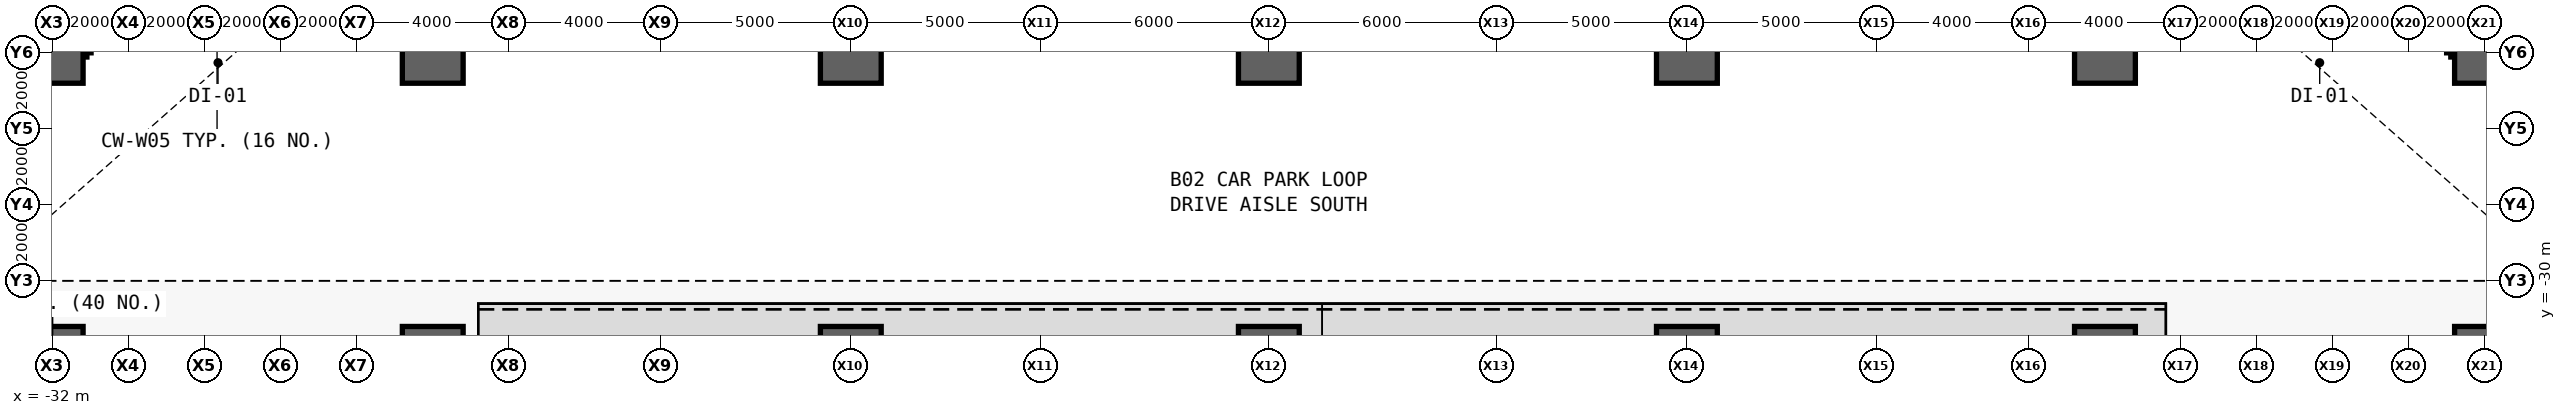
"""IFC4 building model, lengths in metres.
Left out: names, types, materials, properties, quantities, classifications, styles, units other than length and angle.
Written with IfcOpenShell. Run it as: python <this file> out.ifc"""

import sys

from ifc_helpers import new_model, si_unit, direction, frame, frame_2d, origin, origin_2d, place, context, subcontext, project, spatial, rectangle, extrude, source, transform, mapped, element, save


model = new_model("IFC4")
c1 = context("Model", 3, precision=1e-05, world=origin(), true_north=direction((0.0, 1.0)))
c2 = subcontext(c1, "Body", "Model", "MODEL_VIEW")
j1 = project(units=[si_unit("LENGTHUNIT", "METRE"), si_unit("PLANEANGLEUNIT", "RADIAN")], contexts=[c1])
p1 = place(None, origin())
s1 = spatial("IfcSite", under=j1, at=p1, CompositionType="ELEMENT")
p2 = place(p1, origin())
s2 = spatial("IfcBuilding", under=s1, at=p2, CompositionType="ELEMENT")
p3 = place(p2, frame((0.0, 0.0, -9.6)))
s3 = spatial("IfcBuildingStorey", under=s2, at=p3, CompositionType="ELEMENT", Elevation=-9.6)
m1 = source(origin(), c2, "Body", "SweptSolid", [
    extrude(rectangle(XDim=1.6, YDim=1.6, at=origin_2d()), origin(), (0.0, 0.0, 1.0), 4.8),
])
for number, where, z_axis, x_axis in (
    (1, (-32.0, -32.0, 0.0), (0.0, 0.0, 1.0), (1.0, 0.0, 0.0)),
    (2, (-32.0, -24.0, 0.0), (0.0, 0.0, 1.0), (1.0, 0.0, 0.0)),
    (3, (-22.0, -32.0, 0.0), (0.0, 0.0, 1.0), (1.0, 0.0, 0.0)),
    (4, (-22.0, -24.0, 0.0), (0.0, 0.0, 1.0), (1.0, 0.0, 0.0)),
    (5, (-11.0, -32.0, 0.0), (0.0, 0.0, 1.0), (1.0, 0.0, 0.0)),
    (6, (-11.0, -24.0, 0.0), (0.0, 0.0, 1.0), (1.0, 0.0, 0.0)),
    (7, (0.0, -32.0, 0.0), (0.0, 0.0, 1.0), (1.0, 0.0, 0.0)),
    (8, (0.0, -24.0, 0.0), (0.0, 0.0, 1.0), (1.0, 0.0, 0.0)),
    (9, (11.0, -32.0, 0.0), (0.0, 0.0, 1.0), (1.0, 0.0, 0.0)),
    (10, (11.0, -24.0, 0.0), (0.0, 0.0, 1.0), (1.0, 0.0, 0.0)),
    (11, (22.0, -32.0, 0.0), (0.0, 0.0, 1.0), (1.0, 0.0, 0.0)),
    (12, (22.0, -24.0, 0.0), (0.0, 0.0, 1.0), (1.0, 0.0, 0.0)),
    (13, (32.0, -32.0, 0.0), (0.0, 0.0, 1.0), (1.0, 0.0, 0.0)),
    (14, (32.0, -24.0, 0.0), (0.0, 0.0, 1.0), (1.0, 0.0, 0.0)),
):
    element("IfcColumn", number, at=place(p3, frame(where, z_axis=z_axis, x_axis=x_axis)), inside=s3, PredefinedType="COLUMN", context=c2, shape_type="MappedRepresentation", body=[
        mapped(m1, transform((0.0, 0.0, 0.0), scale=1.0)),
    ])
m2 = source(origin(), c2, "Body", "SweptSolid", [
    extrude(rectangle(XDim=48.0, YDim=0.22, at=frame_2d((24.0, 0.0))), origin(), (0.0, 0.0, 1.0), 4.48),
])
p4 = place(p3, frame((-31.1, -24.0, 0.0), z_axis=(0.0, 0.0, 1.0), x_axis=(0.0, 1.0, 0.0)))
e15 = element("IfcWall", 15, at=p4, inside=s3, PredefinedType="PARTITIONING", context=c2, shape_type="MappedRepresentation", body=[
    mapped(m2, transform((0.0, 0.0, 0.0), scale=1.0)),
])
m3 = source(origin(), c2, "Body", "SweptSolid", [
    extrude(rectangle(XDim=1.5, YDim=2.3, at=frame_2d((0.75, 1.15))), frame((0.0, 0.12, 0.0), z_axis=(0.0, -1.0, 0.0), x_axis=(1.0, 0.0, 0.0)), (0.0, 0.0, 1.0), 0.24),
])
p5 = place(p4, frame((6.25, 0.0, 0.0)))
e16 = element("IfcOpeningElement", 16, at=p5, cuts=e15, PredefinedType="OPENING", context=c2, shape_type="MappedRepresentation", body=[
    mapped(m3, transform((0.0, 0.0, 0.0), scale=1.0)),
])
p6 = place(p4, frame((40.25, 0.0, 0.0)))
e17 = element("IfcOpeningElement", 17, at=p6, cuts=e15, PredefinedType="OPENING", context=c2, shape_type="MappedRepresentation", body=[
    mapped(m3, transform((0.0, 0.0, 0.0), scale=1.0)),
])
m4 = source(origin(), c2, "Body", "SweptSolid", [
    extrude(rectangle(XDim=14.7, YDim=0.22, at=frame_2d((7.35, 0.0))), origin(), (0.0, 0.0, 1.0), 3.444),
])
p7 = place(p3, frame((-45.8, -24.0, 0.0), z_axis=(0.0, 0.0, 1.0), x_axis=(1.0, 0.0, 0.0)))
e18 = element("IfcWall", 18, at=p7, inside=s3, PredefinedType="PARTITIONING", context=c2, shape_type="MappedRepresentation", body=[
    mapped(m4, transform((0.0, 0.0, 0.0), scale=1.0)),
])
p8 = place(p3, frame((31.1, -24.0, 0.0), z_axis=(0.0, 0.0, 1.0), x_axis=(0.0, 1.0, 0.0)))
e19 = element("IfcWall", 19, at=p8, inside=s3, PredefinedType="PARTITIONING", context=c2, shape_type="MappedRepresentation", body=[
    mapped(m2, transform((0.0, 0.0, 0.0), scale=1.0)),
])
p9 = place(p8, frame((6.25, 0.0, 0.0)))
e20 = element("IfcOpeningElement", 20, at=p9, cuts=e19, PredefinedType="OPENING", context=c2, shape_type="MappedRepresentation", body=[
    mapped(m3, transform((0.0, 0.0, 0.0), scale=1.0)),
])
p10 = place(p8, frame((40.25, 0.0, 0.0)))
e21 = element("IfcOpeningElement", 21, at=p10, cuts=e19, PredefinedType="OPENING", context=c2, shape_type="MappedRepresentation", body=[
    mapped(m3, transform((0.0, 0.0, 0.0), scale=1.0)),
])
p11 = place(p3, frame((31.1, -24.0, 0.0), z_axis=(0.0, 0.0, 1.0), x_axis=(1.0, 0.0, 0.0)))
e22 = element("IfcWall", 22, at=p11, inside=s3, PredefinedType="PARTITIONING", context=c2, shape_type="MappedRepresentation", body=[
    mapped(m4, transform((0.0, 0.0, 0.0), scale=1.0)),
])
save(model, sys.argv[1])
